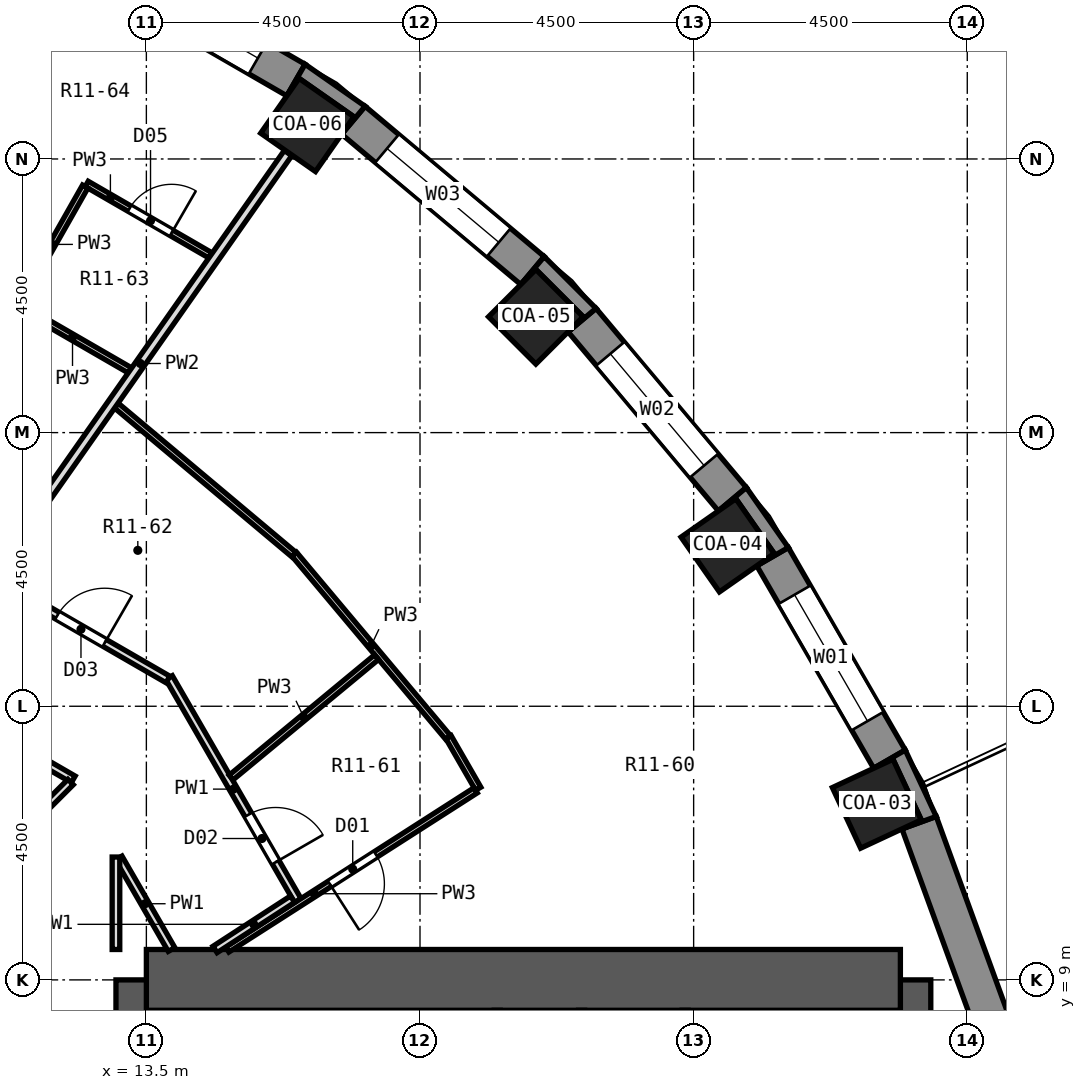
"""IFC4 building model, lengths in metres.
Left out: names, types, materials, properties, quantities, classifications, styles, units other than length and angle.
Written with IfcOpenShell. Run it as: python <this file> out.ifc"""

import sys

from ifc_helpers import new_model, si_unit, direction, frame, frame_2d, origin, origin_2d, place, context, subcontext, project, spatial, polyline, rectangle, outline, extrude, element, fill, save


model = new_model("IFC4")
c1 = context("Model", 3, precision=1e-05, world=origin(), true_north=direction((0.0, 1.0)))
c2 = subcontext(c1, "Body", "Model", "MODEL_VIEW")
j1 = project(units=[si_unit("LENGTHUNIT", "METRE"), si_unit("PLANEANGLEUNIT", "RADIAN")], contexts=[c1])
p1 = place(None, origin())
s1 = spatial("IfcSite", under=j1, at=p1, CompositionType="ELEMENT")
p2 = place(p1, origin())
s2 = spatial("IfcBuilding", under=s1, at=p2, CompositionType="ELEMENT")
p3 = place(p2, frame((0.0, 0.0, 46.1)))
s3 = spatial("IfcBuildingStorey", under=s2, at=p3, CompositionType="ELEMENT", Elevation=46.1)
for number, where, z_axis, x_axis in (
    (1, (25.512, 11.897, 0.0), (0.0, 0.0, 1.0), (0.906, 0.423, 0.0)),
    (2, (23.059, 16.146, 0.0), (0.0, 0.0, 1.0), (0.819, 0.574, 0.0)),
    (3, (19.905, 19.905, 0.0), (0.0, 0.0, 1.0), (0.707, 0.707, 0.0)),
    (4, (16.146, 23.059, 0.0), (0.0, 0.0, 1.0), (0.574, 0.819, 0.0)),
):
    element("IfcColumn", number, at=place(p3, frame(where, z_axis=z_axis, x_axis=x_axis)), inside=s3, PredefinedType="COLUMN", context=c2, shape_type="SweptSolid", body=[
        extrude(rectangle(XDim=1.1, YDim=1.1, at=origin_2d()), origin(), (0.0, 0.0, 1.0), 3.3),
    ])
p4 = place(p3, frame((13.5, -9.0, 0.0), z_axis=(0.0, 0.0, 1.0), x_axis=(0.0, 1.0, 0.0)))
e5 = element("IfcWall", 5, at=p4, inside=s3, PredefinedType="SHEAR", context=c2, shape_type="SweptSolid", body=[
    extrude(rectangle(XDim=18.0, YDim=1.0, at=frame_2d((9.0, 0.0))), origin(), (0.0, 0.0, 1.0), 3.3),
])
p5 = place(p4, frame((15.4, 0.0, 0.0)))
e6 = element("IfcOpeningElement", 6, at=p5, cuts=e5, PredefinedType="OPENING", context=c2, shape_type="SweptSolid", body=[
    extrude(rectangle(XDim=1.2, YDim=2.1, at=frame_2d((0.6, 1.05))), frame((0.0, 0.512, 0.0), z_axis=(0.0, -1.0, 0.0), x_axis=(1.0, 0.0, 0.0)), (0.0, 0.0, 1.0), 1.024),
])
p6 = place(p4, frame((1.4, 0.0, 0.0)))
e7 = element("IfcOpeningElement", 7, at=p6, cuts=e5, PredefinedType="OPENING", context=c2, shape_type="SweptSolid", body=[
    extrude(rectangle(XDim=1.2, YDim=2.1, at=frame_2d((0.6, 1.05))), frame((0.0, 0.512, 0.0), z_axis=(0.0, -1.0, 0.0), x_axis=(1.0, 0.0, 0.0)), (0.0, 0.0, 1.0), 1.024),
])
p7 = place(p4, frame((7.5, 0.0, 0.0)))
e8 = element("IfcOpeningElement", 8, at=p7, cuts=e5, PredefinedType="OPENING", context=c2, shape_type="SweptSolid", body=[
    extrude(rectangle(XDim=3.0, YDim=2.4, at=frame_2d((1.5, 1.2))), frame((0.0, 0.512, 0.0), z_axis=(0.0, -1.0, 0.0), x_axis=(1.0, 0.0, 0.0)), (0.0, 0.0, 1.0), 1.024),
])
p8 = place(p3, frame((25.9, -9.0, 0.0), z_axis=(0.0, 0.0, 1.0), x_axis=(0.0, 1.0, 0.0)))
e9 = element("IfcWall", 9, at=p8, inside=s3, PredefinedType="SHEAR", context=c2, shape_type="SweptSolid", body=[
    extrude(rectangle(XDim=18.0, YDim=1.0, at=frame_2d((9.0, 0.0))), origin(), (0.0, 0.0, 1.0), 3.3),
])
p9 = place(p3, frame((13.5, 9.0, 0.0), z_axis=(0.0, 0.0, 1.0), x_axis=(1.0, 0.0, 0.0)))
e10 = element("IfcWall", 10, at=p9, inside=s3, PredefinedType="SHEAR", context=c2, shape_type="SweptSolid", body=[
    extrude(rectangle(XDim=12.4, YDim=1.0, at=frame_2d((6.2, 0.0))), origin(), (0.0, 0.0, 1.0), 3.3),
])
p10 = place(p3, frame((27.523, 7.971, 0.0), z_axis=(0.0, 0.0, 1.0), x_axis=(-0.342028474173, 0.939689588564, 0.0)))
e11 = element("IfcWall", 11, at=p10, inside=s3, PredefinedType="SOLIDWALL", context=c2, shape_type="SweptSolid", body=[
    extrude(rectangle(XDim=3.846, YDim=0.6, at=frame_2d((1.923, 0.0))), origin(), (0.0, 0.0, 1.0), 2.75),
])
p11 = place(p3, frame((25.721, 12.63, 0.0), z_axis=(0.0, 0.0, 1.0), x_axis=(-0.499989888488, 0.86603124159, 0.0)))
e12 = element("IfcWall", 12, at=p11, inside=s3, PredefinedType="SOLIDWALL", context=c2, shape_type="SweptSolid", body=[
    extrude(rectangle(XDim=3.846, YDim=0.6, at=frame_2d((1.923, 0.0))), origin(), (0.0, 0.0, 1.0), 2.75),
])
p12 = place(p11, frame((0.723, 0.0, 0.9)))
e13 = element("IfcOpeningElement", 13, at=p12, cuts=e12, PredefinedType="OPENING", context=c2, shape_type="SweptSolid", body=[
    extrude(rectangle(XDim=2.4, YDim=1.8, at=frame_2d((1.2, 0.9))), frame((0.0, 0.312, 0.0), z_axis=(0.0, -1.0, 0.0), x_axis=(1.0, 0.0, 0.0)), (0.0, 0.0, 1.0), 0.624),
])
p13 = place(p3, frame((23.137, 16.904, 0.0), z_axis=(0.0, 0.0, 1.0), x_axis=(-0.642809392687, 0.766026164483, 0.0)))
e14 = element("IfcWall", 14, at=p13, inside=s3, PredefinedType="SOLIDWALL", context=c2, shape_type="SweptSolid", body=[
    extrude(rectangle(XDim=3.846, YDim=0.6, at=frame_2d((1.923, 0.0))), origin(), (0.0, 0.0, 1.0), 2.75),
])
p14 = place(p13, frame((0.723, 0.0, 0.9)))
e15 = element("IfcOpeningElement", 15, at=p14, cuts=e14, PredefinedType="OPENING", context=c2, shape_type="SweptSolid", body=[
    extrude(rectangle(XDim=2.4, YDim=1.8, at=frame_2d((1.2, 0.9))), frame((0.0, 0.312, 0.0), z_axis=(0.0, -1.0, 0.0), x_axis=(1.0, 0.0, 0.0)), (0.0, 0.0, 1.0), 0.624),
])
p15 = place(p3, frame((19.85, 20.665, 0.0), z_axis=(0.0, 0.0, 1.0), x_axis=(-0.766026164483, 0.642809392687, 0.0)))
e16 = element("IfcWall", 16, at=p15, inside=s3, PredefinedType="SOLIDWALL", context=c2, shape_type="SweptSolid", body=[
    extrude(rectangle(XDim=3.846, YDim=0.6, at=frame_2d((1.923, 0.0))), origin(), (0.0, 0.0, 1.0), 2.75),
])
p16 = place(p15, frame((0.723, 0.0, 0.9)))
e17 = element("IfcOpeningElement", 17, at=p16, cuts=e16, PredefinedType="OPENING", context=c2, shape_type="SweptSolid", body=[
    extrude(rectangle(XDim=2.4, YDim=1.8, at=frame_2d((1.2, 0.9))), frame((0.0, 0.312, 0.0), z_axis=(0.0, -1.0, 0.0), x_axis=(1.0, 0.0, 0.0)), (0.0, 0.0, 1.0), 0.624),
])
p17 = place(p3, frame((15.96, 23.798, 0.0), z_axis=(0.0, 0.0, 1.0), x_axis=(-0.86603124159, 0.499989888488, 0.0)))
e18 = element("IfcWall", 18, at=p17, inside=s3, PredefinedType="SOLIDWALL", context=c2, shape_type="SweptSolid", body=[
    extrude(rectangle(XDim=3.846, YDim=0.6, at=frame_2d((1.923, 0.0))), origin(), (0.0, 0.0, 1.0), 2.75),
])
p18 = place(p17, frame((0.723, 0.0, 0.9)))
e19 = element("IfcOpeningElement", 19, at=p18, cuts=e18, PredefinedType="OPENING", context=c2, shape_type="SweptSolid", body=[
    extrude(rectangle(XDim=2.4, YDim=1.8, at=frame_2d((1.2, 0.9))), frame((0.0, 0.312, 0.0), z_axis=(0.0, -1.0, 0.0), x_axis=(1.0, 0.0, 0.0)), (0.0, 0.0, 1.0), 0.624),
])
p19 = place(p3, origin())
e20 = element("IfcWall", 20, at=p19, inside=s3, PredefinedType="SOLIDWALL", context=c2, shape_type="SweptSolid", body=[
    extrude(outline(polyline([(25.981, 12.78), (25.461, 12.479), (25.779, 12.628), (26.243, 11.631), (25.926, 11.483), (26.49, 11.688), (25.981, 12.78)])), origin(), (0.0, 0.0, 1.0), 2.75),
])
p20 = place(p3, origin())
e21 = element("IfcWall", 21, at=p20, inside=s3, PredefinedType="SOLIDWALL", context=c2, shape_type="SweptSolid", body=[
    extrude(outline(polyline([(24.058, 16.11), (23.367, 17.097), (22.907, 16.711), (23.194, 16.912), (23.825, 16.011), (23.538, 15.81), (24.058, 16.11)])), origin(), (0.0, 0.0, 1.0), 2.75),
])
p21 = place(p3, origin())
e22 = element("IfcWall", 22, at=p21, inside=s3, PredefinedType="SOLIDWALL", context=c2, shape_type="SweptSolid", body=[
    extrude(outline(polyline([(20.043, 20.895), (19.657, 20.435), (19.905, 20.683), (20.683, 19.905), (20.435, 19.657), (20.895, 20.043), (20.043, 20.895)])), origin(), (0.0, 0.0, 1.0), 2.75),
])
p22 = place(p3, origin())
e23 = element("IfcWall", 23, at=p22, inside=s3, PredefinedType="SOLIDWALL", context=c2, shape_type="SweptSolid", body=[
    extrude(outline(polyline([(17.097, 23.367), (16.11, 24.058), (15.81, 23.538), (16.011, 23.825), (16.912, 23.194), (16.711, 22.907), (17.097, 23.367)])), origin(), (0.0, 0.0, 1.0), 2.75),
])
p23 = place(p3, frame((18.468, 12.993, 0.0), z_axis=(0.0, 0.0, 1.0), x_axis=(0.499060839642, -0.866566949713, 0.0)))
e24 = element("IfcWall", 24, at=p23, inside=s3, PredefinedType="PARTITIONING", context=c2, shape_type="SweptSolid", body=[
    extrude(rectangle(XDim=0.98, YDim=0.1, at=frame_2d((0.49, 0.0))), origin(), (0.0, 0.0, 1.0), 2.75),
])
p24 = place(p3, frame((13.045, 11.005, 0.0), z_axis=(0.0, 0.0, 1.0), x_axis=(0.500066958712, -0.865986741702, 0.0)))
e25 = element("IfcWall", 25, at=p24, inside=s3, PredefinedType="PARTITIONING", context=c2, shape_type="SweptSolid", body=[
    extrude(rectangle(XDim=1.738, YDim=0.125, at=frame_2d((0.869, 0.0))), origin(), (0.0, 0.0, 1.0), 2.75),
])
p25 = place(p3, frame((13.873, 13.971, 0.0), z_axis=(0.0, 0.0, 1.0), x_axis=(0.500056722401, -0.865992652614, 0.0)))
e26 = element("IfcWall", 26, at=p25, inside=s3, PredefinedType="PARTITIONING", context=c2, shape_type="SweptSolid", body=[
    extrude(rectangle(XDim=4.236, YDim=0.125, at=frame_2d((2.118, 0.0))), origin(), (0.0, 0.0, 1.0), 2.75),
])
p26 = place(p25, frame((2.606, 0.0, 0.0)))
e27 = element("IfcOpeningElement", 27, at=p26, cuts=e26, PredefinedType="OPENING", context=c2, shape_type="SweptSolid", body=[
    extrude(rectangle(XDim=0.9, YDim=2.1, at=frame_2d((0.45, 1.05))), frame((0.0, 0.074, 0.0), z_axis=(0.0, -1.0, 0.0), x_axis=(1.0, 0.0, 0.0)), (0.0, 0.0, 1.0), 0.149),
])
p27 = place(p3, frame((15.93, 16.002, 0.0), z_axis=(0.0, 0.0, 1.0), x_axis=(0.642925836876, -0.76592843548, 0.0)))
e28 = element("IfcWall", 28, at=p27, inside=s3, PredefinedType="PARTITIONING", context=c2, shape_type="SweptSolid", body=[
    extrude(rectangle(XDim=3.936, YDim=0.1, at=frame_2d((1.968, 0.0))), origin(), (0.0, 0.0, 1.0), 2.75),
])
p28 = place(p3, frame((13.006, 18.445, 0.0), z_axis=(0.0, 0.0, 1.0), x_axis=(0.765937067023, -0.642915553832, 0.0)))
e29 = element("IfcWall", 29, at=p28, inside=s3, PredefinedType="PARTITIONING", context=c2, shape_type="SweptSolid", body=[
    extrude(rectangle(XDim=3.81, YDim=0.1, at=frame_2d((1.905, 0.0))), origin(), (0.0, 0.0, 1.0), 2.75),
])
p29 = place(p3, frame((4.439, 16.836, 0.0), z_axis=(0.0, 0.0, 1.0), x_axis=(0.865982621983, -0.500074092933, 0.0)))
e30 = element("IfcWall", 30, at=p29, inside=s3, PredefinedType="PARTITIONING", context=c2, shape_type="SweptSolid", body=[
    extrude(rectangle(XDim=9.075, YDim=0.125, at=frame_2d((4.537, 0.0))), origin(), (0.0, 0.0, 1.0), 2.75),
])
p30 = place(p3, frame((5.029, 19.036, 0.0), z_axis=(0.0, 0.0, 1.0), x_axis=(0.866024825845, -0.50000100102, 0.0)))
e31 = element("IfcWall", 31, at=p30, inside=s3, PredefinedType="PARTITIONING", context=c2, shape_type="SweptSolid", body=[
    extrude(rectangle(XDim=10.192, YDim=0.125, at=frame_2d((5.096, 0.0))), origin(), (0.0, 0.0, 1.0), 2.75),
])
p31 = place(p30, frame((8.09, 0.0, 0.0)))
e32 = element("IfcOpeningElement", 32, at=p31, cuts=e31, PredefinedType="OPENING", context=c2, shape_type="SweptSolid", body=[
    extrude(rectangle(XDim=0.9, YDim=2.1, at=frame_2d((0.45, 1.05))), frame((0.0, 0.074, 0.0), z_axis=(0.0, -1.0, 0.0), x_axis=(1.0, 0.0, 0.0)), (0.0, 0.0, 1.0), 0.149),
])
p32 = place(p3, frame((11.342, 20.114, 0.0), z_axis=(0.0, 0.0, 1.0), x_axis=(0.865827333674, -0.500342910675, 0.0)))
e33 = element("IfcWall", 33, at=p32, inside=s3, PredefinedType="PARTITIONING", context=c2, shape_type="SweptSolid", body=[
    extrude(rectangle(XDim=2.18, YDim=0.1, at=frame_2d((1.09, 0.0))), origin(), (0.0, 0.0, 1.0), 2.75),
])
p33 = place(p3, frame((12.519, 22.09, 0.0), z_axis=(0.0, 0.0, 1.0), x_axis=(0.865796038429, -0.500397062182, 0.0)))
e34 = element("IfcWall", 34, at=p33, inside=s3, PredefinedType="PARTITIONING", context=c2, shape_type="SweptSolid", body=[
    extrude(rectangle(XDim=2.349, YDim=0.1, at=frame_2d((1.175, 0.0))), origin(), (0.0, 0.0, 1.0), 2.75),
])
p34 = place(p33, frame((0.812, 0.0, 0.0)))
e35 = element("IfcOpeningElement", 35, at=p34, cuts=e34, PredefinedType="OPENING", context=c2, shape_type="SweptSolid", body=[
    extrude(rectangle(XDim=0.8, YDim=2.1, at=frame_2d((0.4, 1.05))), frame((0.0, 0.062, 0.0), z_axis=(0.0, -1.0, 0.0), x_axis=(1.0, 0.0, 0.0)), (0.0, 0.0, 1.0), 0.124),
])
p35 = place(p3, frame((14.83, 9.5, 0.0), z_axis=(0.0, 0.0, 1.0), x_axis=(0.842016302485, 0.539452079752, 0.0)))
e36 = element("IfcWall", 36, at=p35, inside=s3, PredefinedType="PARTITIONING", context=c2, shape_type="SweptSolid", body=[
    extrude(rectangle(XDim=4.851, YDim=0.1, at=frame_2d((2.426, 0.0))), origin(), (0.0, 0.0, 1.0), 2.75),
])
p36 = place(p35, frame((2.001, 0.0, 0.0)))
e37 = element("IfcOpeningElement", 37, at=p36, cuts=e36, PredefinedType="OPENING", context=c2, shape_type="SweptSolid", body=[
    extrude(rectangle(XDim=0.9, YDim=2.1, at=frame_2d((0.45, 1.05))), frame((0.0, 0.062, 0.0), z_axis=(0.0, -1.0, 0.0), x_axis=(1.0, 0.0, 0.0)), (0.0, 0.0, 1.0), 0.124),
])
p37 = place(p3, frame((14.629, 9.5, 0.0), z_axis=(0.0, 0.0, 1.0), x_axis=(0.83882853689, 0.544395706908, 0.0)))
e38 = element("IfcWall", 38, at=p37, inside=s3, PredefinedType="PARTITIONING", context=c2, shape_type="SweptSolid", body=[
    extrude(rectangle(XDim=1.521, YDim=0.125, at=frame_2d((0.76, 0.0))), origin(), (0.0, 0.0, 1.0), 2.75),
])
p38 = place(p3, frame((14.893, 12.328, 0.0), z_axis=(0.0, 0.0, 1.0), x_axis=(0.770464868695, 0.63748245945, 0.0)))
e39 = element("IfcWall", 39, at=p38, inside=s3, PredefinedType="PARTITIONING", context=c2, shape_type="SweptSolid", body=[
    extrude(rectangle(XDim=3.106, YDim=0.1, at=frame_2d((1.553, 0.0))), origin(), (0.0, 0.0, 1.0), 2.75),
])
p39 = place(p3, frame((6.783, 6.783, 0.0), z_axis=(0.0, 0.0, 1.0), x_axis=(0.707106781187, 0.707106781187, 0.0)))
e40 = element("IfcWall", 40, at=p39, inside=s3, PredefinedType="PARTITIONING", context=c2, shape_type="SweptSolid", body=[
    extrude(rectangle(XDim=7.738, YDim=0.125, at=frame_2d((3.869, 0.0))), origin(), (0.0, 0.0, 1.0), 2.75),
])
p40 = place(p3, frame((10.972, 15.677, 0.0), z_axis=(0.0, 0.0, 1.0), x_axis=(0.574550995915, 0.818468785656, 0.0)))
e41 = element("IfcWall", 41, at=p40, inside=s3, PredefinedType="PARTITIONING", context=c2, shape_type="SweptSolid", body=[
    extrude(rectangle(XDim=8.455, YDim=0.15, at=frame_2d((4.228, 0.0))), origin(), (0.0, 0.0, 1.0), 2.75),
])
p41 = place(p3, frame((11.416, 20.143, 0.0), z_axis=(0.0, 0.0, 1.0), x_axis=(0.493082970536, 0.869982289571, 0.0)))
e42 = element("IfcWall", 42, at=p41, inside=s3, PredefinedType="PARTITIONING", context=c2, shape_type="SweptSolid", body=[
    extrude(rectangle(XDim=2.188, YDim=0.1, at=frame_2d((1.094, 0.0))), origin(), (0.0, 0.0, 1.0), 2.75),
])
p42 = place(p3, frame((13.0, 9.5, 0.0), z_axis=(0.0, 0.0, 1.0), x_axis=(0.0, 1.0, 0.0)))
e43 = element("IfcWall", 43, at=p42, inside=s3, PredefinedType="PARTITIONING", context=c2, shape_type="SweptSolid", body=[
    extrude(rectangle(XDim=1.521, YDim=0.125, at=frame_2d((0.76, 0.0))), origin(), (0.0, 0.0, 1.0), 2.75),
])
p43 = place(p3, frame((19.27, 5.3, 0.0), z_axis=(0.0, 0.0, 1.0), x_axis=(0.0, 1.0, 0.0)))
e44 = element("IfcWall", 44, at=p43, inside=s3, PredefinedType="PARTITIONING", context=c2, shape_type="SweptSolid", body=[
    extrude(rectangle(XDim=3.2, YDim=0.1, at=frame_2d((1.6, 0.0))), origin(), (0.0, 0.0, 1.0), 2.75),
])
p44 = place(p3, frame((20.658, 5.3, 0.0), z_axis=(0.0, 0.0, 1.0), x_axis=(0.0, 1.0, 0.0)))
e45 = element("IfcWall", 45, at=p44, inside=s3, PredefinedType="PARTITIONING", context=c2, shape_type="SweptSolid", body=[
    extrude(rectangle(XDim=3.2, YDim=0.1, at=frame_2d((1.6, 0.0))), origin(), (0.0, 0.0, 1.0), 2.75),
])
p45 = place(p44, frame((1.15, 0.0, 0.0)))
e46 = element("IfcOpeningElement", 46, at=p45, cuts=e45, PredefinedType="OPENING", context=c2, shape_type="SweptSolid", body=[
    extrude(rectangle(XDim=0.9, YDim=2.1, at=frame_2d((0.45, 1.05))), frame((0.0, 0.062, 0.0), z_axis=(0.0, -1.0, 0.0), x_axis=(1.0, 0.0, 0.0)), (0.0, 0.0, 1.0), 0.124),
])
p46 = place(p3, frame((22.36, 5.3, 0.0), z_axis=(0.0, 0.0, 1.0), x_axis=(0.0, 1.0, 0.0)))
e47 = element("IfcWall", 47, at=p46, inside=s3, PredefinedType="PARTITIONING", context=c2, shape_type="SweptSolid", body=[
    extrude(rectangle(XDim=3.2, YDim=0.1, at=frame_2d((1.6, 0.0))), origin(), (0.0, 0.0, 1.0), 2.75),
])
p47 = place(p12, origin())
e48 = element("IfcWindow", 48, at=p47, inside=s3, PartitioningType="SINGLE_PANEL", PredefinedType="WINDOW", context=c2, shape_type="SweptSolid", body=[
    extrude(rectangle(XDim=2.4, YDim=1.8, at=frame_2d((1.2, 0.9))), frame((0.0, 0.18, 0.0), z_axis=(0.0, -1.0, 0.0), x_axis=(1.0, 0.0, 0.0)), (0.0, 0.0, 1.0), 0.06),
])
fill(e13, e48)
p48 = place(p14, origin())
e49 = element("IfcWindow", 49, at=p48, inside=s3, PartitioningType="SINGLE_PANEL", PredefinedType="WINDOW", context=c2, shape_type="SweptSolid", body=[
    extrude(rectangle(XDim=2.4, YDim=1.8, at=frame_2d((1.2, 0.9))), frame((0.0, 0.18, 0.0), z_axis=(0.0, -1.0, 0.0), x_axis=(1.0, 0.0, 0.0)), (0.0, 0.0, 1.0), 0.06),
])
fill(e15, e49)
p49 = place(p16, origin())
e50 = element("IfcWindow", 50, at=p49, inside=s3, PartitioningType="SINGLE_PANEL", PredefinedType="WINDOW", context=c2, shape_type="SweptSolid", body=[
    extrude(rectangle(XDim=2.4, YDim=1.8, at=frame_2d((1.2, 0.9))), frame((0.0, 0.18, 0.0), z_axis=(0.0, -1.0, 0.0), x_axis=(1.0, 0.0, 0.0)), (0.0, 0.0, 1.0), 0.06),
])
fill(e17, e50)
p50 = place(p18, origin())
e51 = element("IfcWindow", 51, at=p50, inside=s3, PartitioningType="SINGLE_PANEL", PredefinedType="WINDOW", context=c2, shape_type="SweptSolid", body=[
    extrude(rectangle(XDim=2.4, YDim=1.8, at=frame_2d((1.2, 0.9))), frame((0.0, 0.18, 0.0), z_axis=(0.0, -1.0, 0.0), x_axis=(1.0, 0.0, 0.0)), (0.0, 0.0, 1.0), 0.06),
])
fill(e19, e51)
p51 = place(p36, frame((0.9, 0.0, 0.0), z_axis=(0.0, 0.0, 1.0), x_axis=(-1.0, 0.0, 0.0)))
e52 = element("IfcDoor", 52, at=p51, inside=s3, OperationType="SINGLE_SWING_RIGHT", PredefinedType="DOOR", context=c2, shape_type="SweptSolid", body=[
    extrude(rectangle(XDim=0.9, YDim=2.1, at=frame_2d((0.45, 1.05))), frame((0.0, 0.025, 0.0), z_axis=(0.0, -1.0, 0.0), x_axis=(1.0, 0.0, 0.0)), (0.0, 0.0, 1.0), 0.05),
])
fill(e37, e52)
p52 = place(p26, origin())
e53 = element("IfcDoor", 53, at=p52, inside=s3, OperationType="SINGLE_SWING_RIGHT", PredefinedType="DOOR", context=c2, shape_type="SweptSolid", body=[
    extrude(rectangle(XDim=0.9, YDim=2.1, at=frame_2d((0.45, 1.05))), frame((0.0, 0.025, 0.0), z_axis=(0.0, -1.0, 0.0), x_axis=(1.0, 0.0, 0.0)), (0.0, 0.0, 1.0), 0.05),
])
fill(e27, e53)
p53 = place(p31, origin())
e54 = element("IfcDoor", 54, at=p53, inside=s3, OperationType="SINGLE_SWING_RIGHT", PredefinedType="DOOR", context=c2, shape_type="SweptSolid", body=[
    extrude(rectangle(XDim=0.9, YDim=2.1, at=frame_2d((0.45, 1.05))), frame((0.0, 0.025, 0.0), z_axis=(0.0, -1.0, 0.0), x_axis=(1.0, 0.0, 0.0)), (0.0, 0.0, 1.0), 0.05),
])
fill(e32, e54)
p54 = place(p34, origin())
e55 = element("IfcDoor", 55, at=p54, inside=s3, OperationType="SINGLE_SWING_RIGHT", PredefinedType="DOOR", context=c2, shape_type="SweptSolid", body=[
    extrude(rectangle(XDim=0.8, YDim=2.1, at=frame_2d((0.4, 1.05))), frame((0.0, 0.025, 0.0), z_axis=(0.0, -1.0, 0.0), x_axis=(1.0, 0.0, 0.0)), (0.0, 0.0, 1.0), 0.05),
])
fill(e35, e55)
save(model, sys.argv[1])
